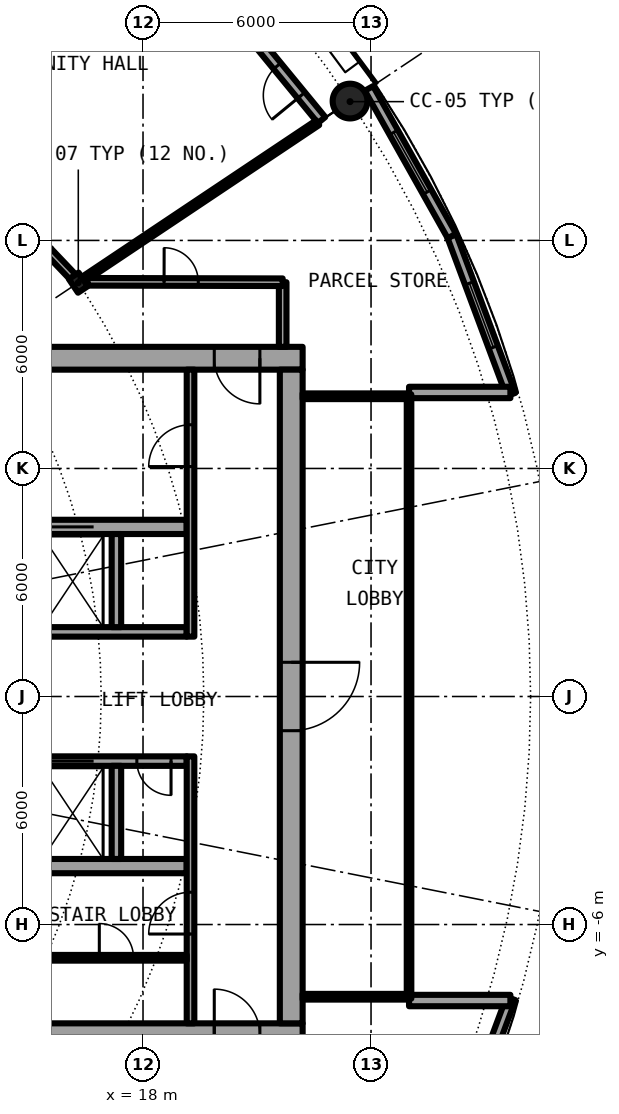
"""IFC4 building model, lengths in metres.
Left out: names, types, materials, properties, quantities, classifications, styles, units other than length and angle.
Written with IfcOpenShell. Run it as: python <this file> out.ifc"""

import sys

from ifc_helpers import new_model, si_unit, direction, frame, frame_2d, origin, origin_2d, place, context, subcontext, project, spatial, rectangle, hollow_circle, i_section, extrude, element, fill, save


model = new_model("IFC4")
c1 = context("Model", 3, precision=1e-05, world=origin(), true_north=direction((0.0, 1.0)))
c2 = subcontext(c1, "Body", "Model", "MODEL_VIEW")
j1 = project(units=[si_unit("LENGTHUNIT", "METRE"), si_unit("PLANEANGLEUNIT", "RADIAN")], contexts=[c1])
p1 = place(None, origin())
s1 = spatial("IfcSite", under=j1, at=p1, CompositionType="ELEMENT")
p2 = place(p1, origin())
s2 = spatial("IfcBuilding", under=s1, at=p2, CompositionType="ELEMENT")
p3 = place(p2, frame((0.0, 0.0, 107.45)))
s3 = spatial("IfcBuildingStorey", under=s2, at=p3, CompositionType="ELEMENT", Elevation=107.45)
p4 = place(p3, frame((23.448, 15.667, 0.0), z_axis=(0.0, 0.0, 1.0), x_axis=(1.0, 0.0, 0.0)))
e1 = element("IfcColumn", 1, at=p4, inside=s3, PredefinedType="COLUMN", context=c2, shape_type="SweptSolid", body=[
    extrude(hollow_circle(Radius=0.457, WallThickness=0.04, at=origin_2d()), origin(), (0.0, 0.0, 1.0), 4.2),
])
p5 = place(p3, frame((16.297, 10.889, 0.0), z_axis=(0.0, 0.0, 1.0), x_axis=(0.831469612303, 0.55557023302, 0.0)))
e2 = element("IfcColumn", 2, at=p5, inside=s3, PredefinedType="COLUMN", context=c2, shape_type="SweptSolid", body=[
    extrude(i_section(OverallWidth=0.307, OverallDepth=0.432, WebThickness=0.021, FlangeThickness=0.04, FilletRadius=0.027, at=origin_2d()), origin(), (0.0, 0.0, 1.0), 4.2),
])
p6 = place(p3, frame((22.699, 15.167, 0.0), z_axis=(0.0, 0.0, 1.0), x_axis=(-0.634382322723, 0.773019449054, 0.0)))
e3 = element("IfcWall", 3, at=p6, inside=s3, PredefinedType="SOLIDWALL", context=c2, shape_type="SweptSolid", body=[
    extrude(rectangle(XDim=5.352, YDim=0.25, at=frame_2d((2.676, 0.0))), origin(), (0.0, 0.0, 1.0), 3.85),
])
p7 = place(p6, frame((0.841, 0.0, 0.0)))
e4 = element("IfcOpeningElement", 4, at=p7, cuts=e3, PredefinedType="OPENING", context=c2, shape_type="SweptSolid", body=[
    extrude(rectangle(XDim=1.0, YDim=2.2, at=frame_2d((0.5, 1.1))), frame((0.0, 0.135, 0.0), z_axis=(0.0, -1.0, 0.0), x_axis=(1.0, 0.0, 0.0)), (0.0, 0.0, 1.0), 0.27),
])
p8 = place(p6, frame((3.51, 0.0, 0.0)))
e5 = element("IfcOpeningElement", 5, at=p8, cuts=e3, PredefinedType="OPENING", context=c2, shape_type="SweptSolid", body=[
    extrude(rectangle(XDim=1.0, YDim=2.2, at=frame_2d((0.5, 1.1))), frame((0.0, 0.135, 0.0), z_axis=(0.0, -1.0, 0.0), x_axis=(1.0, 0.0, 0.0)), (0.0, 0.0, 1.0), 0.27),
])
p9 = place(p3, frame((27.682, 7.945, 0.0), z_axis=(0.0, 0.0, 1.0), x_axis=(-0.349247811493, 0.937030397675, 0.0)))
e6 = element("IfcWall", 6, at=p9, inside=s3, PredefinedType="SOLIDWALL", context=c2, shape_type="SweptSolid", body=[
    extrude(rectangle(XDim=4.452, YDim=0.25, at=frame_2d((2.226, 0.0))), origin(), (0.0, 0.0, 1.0), 3.85),
])
p10 = place(p9, frame((1.327, 0.0, 0.3)))
e7 = element("IfcOpeningElement", 7, at=p10, cuts=e6, PredefinedType="OPENING", context=c2, shape_type="SweptSolid", body=[
    extrude(rectangle(XDim=1.8, YDim=2.1, at=frame_2d((0.9, 1.05))), frame((0.0, 0.135, 0.0), z_axis=(0.0, -1.0, 0.0), x_axis=(1.0, 0.0, 0.0)), (0.0, 0.0, 1.0), 0.27),
])
p11 = place(p3, frame((26.127, 12.117, 0.0), z_axis=(0.0, 0.0, 1.0), x_axis=(-0.489696356642, 0.871893042919, 0.0)))
e8 = element("IfcWall", 8, at=p11, inside=s3, PredefinedType="SOLIDWALL", context=c2, shape_type="SweptSolid", body=[
    extrude(rectangle(XDim=4.454, YDim=0.25, at=frame_2d((2.227, 0.0))), origin(), (0.0, 0.0, 1.0), 3.85),
])
p12 = place(p11, frame((1.327, 0.0, 0.3)))
e9 = element("IfcOpeningElement", 9, at=p12, cuts=e8, PredefinedType="OPENING", context=c2, shape_type="SweptSolid", body=[
    extrude(rectangle(XDim=1.8, YDim=2.1, at=frame_2d((0.9, 1.05))), frame((0.0, 0.135, 0.0), z_axis=(0.0, -1.0, 0.0), x_axis=(1.0, 0.0, 0.0)), (0.0, 0.0, 1.0), 0.27),
])
p13 = place(p3, frame((26.127, -12.117, 0.0), z_axis=(0.0, 0.0, 1.0), x_axis=(0.349247811493, 0.937030397675, 0.0)))
e10 = element("IfcWall", 10, at=p13, inside=s3, PredefinedType="SOLIDWALL", context=c2, shape_type="SweptSolid", body=[
    extrude(rectangle(XDim=4.452, YDim=0.25, at=frame_2d((2.226, 0.0))), origin(), (0.0, 0.0, 1.0), 3.85),
])
p14 = place(p13, frame((1.327, 0.0, 0.3)))
e11 = element("IfcOpeningElement", 11, at=p14, cuts=e10, PredefinedType="OPENING", context=c2, shape_type="SweptSolid", body=[
    extrude(rectangle(XDim=1.8, YDim=2.1, at=frame_2d((0.9, 1.05))), frame((0.0, 0.135, 0.0), z_axis=(0.0, -1.0, 0.0), x_axis=(1.0, 0.0, 0.0)), (0.0, 0.0, 1.0), 0.27),
])
for number, where, z_axis, x_axis in (
    (12, (25.0, 8.0, 0.0), (0.0, 0.0, 1.0), (1.0, 0.0, 0.0)),
    (13, (25.0, -8.0, 0.0), (0.0, 0.0, 1.0), (1.0, 0.0, 0.0)),
):
    element("IfcWall", number, at=place(p3, frame(where, z_axis=z_axis, x_axis=x_axis)), inside=s3, PredefinedType="SOLIDWALL", context=c2, shape_type="SweptSolid", body=[
        extrude(rectangle(XDim=2.667, YDim=0.3, at=frame_2d((1.333, 0.0))), origin(), (0.0, 0.0, 1.0), 3.85),
    ])
p15 = place(p3, frame((22.2, 8.9, 0.0), z_axis=(0.0, 0.0, 1.0), x_axis=(-1.0, 0.0, 0.0)))
e14 = element("IfcWall", 14, at=p15, inside=s3, PredefinedType="SHEAR", context=c2, shape_type="SweptSolid", body=[
    extrude(rectangle(XDim=13.8, YDim=0.6, at=frame_2d((6.9, 0.0))), origin(), (0.0, 0.0, 1.0), 4.2),
])
p16 = place(p15, frame((1.125, 0.0, 0.0)))
e15 = element("IfcOpeningElement", 15, at=p16, cuts=e14, PredefinedType="OPENING", context=c2, shape_type="SweptSolid", body=[
    extrude(rectangle(XDim=1.2, YDim=2.3, at=frame_2d((0.6, 1.15))), frame((0.0, 0.31, 0.0), z_axis=(0.0, -1.0, 0.0), x_axis=(1.0, 0.0, 0.0)), (0.0, 0.0, 1.0), 0.62),
])
p17 = place(p3, frame((8.4, -8.9, 0.0), z_axis=(0.0, 0.0, 1.0), x_axis=(1.0, 0.0, 0.0)))
e16 = element("IfcWall", 16, at=p17, inside=s3, PredefinedType="SHEAR", context=c2, shape_type="SweptSolid", body=[
    extrude(rectangle(XDim=13.8, YDim=0.6, at=frame_2d((6.9, 0.0))), origin(), (0.0, 0.0, 1.0), 4.2),
])
p18 = place(p17, frame((11.475, 0.0, 0.0)))
e17 = element("IfcOpeningElement", 17, at=p18, cuts=e16, PredefinedType="OPENING", context=c2, shape_type="SweptSolid", body=[
    extrude(rectangle(XDim=1.2, YDim=2.3, at=frame_2d((0.6, 1.15))), frame((0.0, 0.31, 0.0), z_axis=(0.0, -1.0, 0.0), x_axis=(1.0, 0.0, 0.0)), (0.0, 0.0, 1.0), 0.62),
])
p19 = place(p3, frame((21.9, 8.6, 0.0), z_axis=(0.0, 0.0, 1.0), x_axis=(0.0, -1.0, 0.0)))
e18 = element("IfcWall", 18, at=p19, inside=s3, PredefinedType="SHEAR", context=c2, shape_type="SweptSolid", body=[
    extrude(rectangle(XDim=17.2, YDim=0.6, at=frame_2d((8.6, 0.0))), origin(), (0.0, 0.0, 1.0), 4.2),
])
p20 = place(p19, frame((7.7, 0.0, 0.0)))
e19 = element("IfcOpeningElement", 19, at=p20, cuts=e18, PredefinedType="OPENING", context=c2, shape_type="SweptSolid", body=[
    extrude(rectangle(XDim=1.8, YDim=2.3, at=frame_2d((0.9, 1.15))), frame((0.0, 0.31, 0.0), z_axis=(0.0, -1.0, 0.0), x_axis=(1.0, 0.0, 0.0)), (0.0, 0.0, 1.0), 0.62),
])
p21 = place(p3, frame((9.0, 1.7, 0.0), z_axis=(0.0, 0.0, 1.0), x_axis=(1.0, 0.0, 0.0)))
e20 = element("IfcWall", 20, at=p21, inside=s3, PredefinedType="SHEAR", context=c2, shape_type="SweptSolid", body=[
    extrude(rectangle(XDim=10.15, YDim=0.25, at=frame_2d((5.075, 0.0))), origin(), (0.0, 0.0, 1.0), 4.2),
])
p22 = place(p21, frame((0.387, 0.0, 0.0)))
e21 = element("IfcOpeningElement", 21, at=p22, cuts=e20, PredefinedType="OPENING", context=c2, shape_type="SweptSolid", body=[
    extrude(rectangle(XDim=1.1, YDim=2.3, at=frame_2d((0.55, 1.15))), frame((0.0, 0.135, 0.0), z_axis=(0.0, -1.0, 0.0), x_axis=(1.0, 0.0, 0.0)), (0.0, 0.0, 1.0), 0.27),
])
p23 = place(p21, frame((2.45, 0.0, 0.0)))
e22 = element("IfcOpeningElement", 22, at=p23, cuts=e20, PredefinedType="OPENING", context=c2, shape_type="SweptSolid", body=[
    extrude(rectangle(XDim=1.1, YDim=2.3, at=frame_2d((0.55, 1.15))), frame((0.0, 0.135, 0.0), z_axis=(0.0, -1.0, 0.0), x_axis=(1.0, 0.0, 0.0)), (0.0, 0.0, 1.0), 0.27),
])
p24 = place(p21, frame((4.45, 0.0, 0.0)))
e23 = element("IfcOpeningElement", 23, at=p24, cuts=e20, PredefinedType="OPENING", context=c2, shape_type="SweptSolid", body=[
    extrude(rectangle(XDim=1.1, YDim=2.3, at=frame_2d((0.55, 1.15))), frame((0.0, 0.135, 0.0), z_axis=(0.0, -1.0, 0.0), x_axis=(1.0, 0.0, 0.0)), (0.0, 0.0, 1.0), 0.27),
])
p25 = place(p3, frame((9.0, 4.462, 0.0), z_axis=(0.0, 0.0, 1.0), x_axis=(1.0, 0.0, 0.0)))
e24 = element("IfcWall", 24, at=p25, inside=s3, PredefinedType="SHEAR", context=c2, shape_type="SweptSolid", body=[
    extrude(rectangle(XDim=10.15, YDim=0.375, at=frame_2d((5.075, 0.0))), origin(), (0.0, 0.0, 1.0), 4.2),
])
p26 = place(p25, frame((6.6, 0.0, 0.0)))
e25 = element("IfcOpeningElement", 25, at=p26, cuts=e24, PredefinedType="OPENING", context=c2, shape_type="SweptSolid", body=[
    extrude(rectangle(XDim=1.1, YDim=2.3, at=frame_2d((0.55, 1.15))), frame((0.0, 0.198, 0.0), z_axis=(0.0, -1.0, 0.0), x_axis=(1.0, 0.0, 0.0)), (0.0, 0.0, 1.0), 0.395),
])
p27 = place(p3, frame((17.3, 1.825, 0.0), z_axis=(0.0, 0.0, 1.0), x_axis=(0.0, 1.0, 0.0)))
e26 = element("IfcWall", 26, at=p27, inside=s3, PredefinedType="SOLIDWALL", context=c2, shape_type="SweptSolid", body=[
    extrude(rectangle(XDim=2.45, YDim=0.25, at=frame_2d((1.225, 0.0))), origin(), (0.0, 0.0, 1.0), 3.85),
])
p28 = place(p3, frame((19.25, 1.575, 0.0), z_axis=(0.0, 0.0, 1.0), x_axis=(0.0, 1.0, 0.0)))
e27 = element("IfcWall", 27, at=p28, inside=s3, PredefinedType="SOLIDWALL", context=c2, shape_type="SweptSolid", body=[
    extrude(rectangle(XDim=7.025, YDim=0.2, at=frame_2d((3.513, 0.0))), origin(), (0.0, 0.0, 1.0), 3.85),
])
p29 = place(p28, frame((4.475, 0.0, 0.0)))
e28 = element("IfcOpeningElement", 28, at=p29, cuts=e27, PredefinedType="OPENING", context=c2, shape_type="SweptSolid", body=[
    extrude(rectangle(XDim=1.1, YDim=2.3, at=frame_2d((0.55, 1.15))), frame((0.0, 0.11, 0.0), z_axis=(0.0, -1.0, 0.0), x_axis=(1.0, 0.0, 0.0)), (0.0, 0.0, 1.0), 0.22),
])
p30 = place(p3, frame((19.15, -1.7, 0.0), z_axis=(0.0, 0.0, 1.0), x_axis=(-1.0, 0.0, 0.0)))
e29 = element("IfcWall", 29, at=p30, inside=s3, PredefinedType="SHEAR", context=c2, shape_type="SweptSolid", body=[
    extrude(rectangle(XDim=10.15, YDim=0.25, at=frame_2d((5.075, 0.0))), origin(), (0.0, 0.0, 1.0), 4.2),
])
p31 = place(p30, frame((2.45, 0.0, 0.0)))
e30 = element("IfcOpeningElement", 30, at=p31, cuts=e29, PredefinedType="OPENING", context=c2, shape_type="SweptSolid", body=[
    extrude(rectangle(XDim=1.1, YDim=2.3, at=frame_2d((0.55, 1.15))), frame((0.0, 0.135, 0.0), z_axis=(0.0, -1.0, 0.0), x_axis=(1.0, 0.0, 0.0)), (0.0, 0.0, 1.0), 0.27),
])
p32 = place(p30, frame((8.788, 0.0, 0.0)))
e31 = element("IfcOpeningElement", 31, at=p32, cuts=e29, PredefinedType="OPENING", context=c2, shape_type="SweptSolid", body=[
    extrude(rectangle(XDim=0.9, YDim=2.3, at=frame_2d((0.45, 1.15))), frame((0.0, 0.135, 0.0), z_axis=(0.0, -1.0, 0.0), x_axis=(1.0, 0.0, 0.0)), (0.0, 0.0, 1.0), 0.27),
])
p33 = place(p30, frame((5.775, 0.0, 0.0)))
e32 = element("IfcOpeningElement", 32, at=p33, cuts=e29, PredefinedType="OPENING", context=c2, shape_type="SweptSolid", body=[
    extrude(rectangle(XDim=0.9, YDim=2.3, at=frame_2d((0.45, 1.15))), frame((0.0, 0.135, 0.0), z_axis=(0.0, -1.0, 0.0), x_axis=(1.0, 0.0, 0.0)), (0.0, 0.0, 1.0), 0.27),
])
p34 = place(p30, frame((0.413, 0.0, 0.0)))
e33 = element("IfcOpeningElement", 33, at=p34, cuts=e29, PredefinedType="OPENING", context=c2, shape_type="SweptSolid", body=[
    extrude(rectangle(XDim=0.9, YDim=2.3, at=frame_2d((0.45, 1.15))), frame((0.0, 0.135, 0.0), z_axis=(0.0, -1.0, 0.0), x_axis=(1.0, 0.0, 0.0)), (0.0, 0.0, 1.0), 0.27),
])
p35 = place(p3, frame((9.0, -4.462, 0.0), z_axis=(0.0, 0.0, 1.0), x_axis=(1.0, 0.0, 0.0)))
e34 = element("IfcWall", 34, at=p35, inside=s3, PredefinedType="SHEAR", context=c2, shape_type="SweptSolid", body=[
    extrude(rectangle(XDim=10.15, YDim=0.375, at=frame_2d((5.075, 0.0))), origin(), (0.0, 0.0, 1.0), 4.2),
])
p36 = place(p3, frame((17.3, -1.825, 0.0), z_axis=(0.0, 0.0, 1.0), x_axis=(0.0, -1.0, 0.0)))
e35 = element("IfcWall", 35, at=p36, inside=s3, PredefinedType="SOLIDWALL", context=c2, shape_type="SweptSolid", body=[
    extrude(rectangle(XDim=2.45, YDim=0.25, at=frame_2d((1.225, 0.0))), origin(), (0.0, 0.0, 1.0), 3.85),
])
p37 = place(p3, frame((19.25, -8.6, 0.0), z_axis=(0.0, 0.0, 1.0), x_axis=(0.0, 1.0, 0.0)))
e36 = element("IfcWall", 36, at=p37, inside=s3, PredefinedType="SOLIDWALL", context=c2, shape_type="SweptSolid", body=[
    extrude(rectangle(XDim=7.025, YDim=0.2, at=frame_2d((3.513, 0.0))), origin(), (0.0, 0.0, 1.0), 3.85),
])
p38 = place(p37, frame((2.35, 0.0, 0.0)))
e37 = element("IfcOpeningElement", 37, at=p38, cuts=e36, PredefinedType="OPENING", context=c2, shape_type="SweptSolid", body=[
    extrude(rectangle(XDim=1.1, YDim=2.3, at=frame_2d((0.55, 1.15))), frame((0.0, 0.11, 0.0), z_axis=(0.0, -1.0, 0.0), x_axis=(1.0, 0.0, 0.0)), (0.0, 0.0, 1.0), 0.22),
])
p39 = place(p3, frame((15.45, -6.875, 0.0), z_axis=(0.0, 0.0, 1.0), x_axis=(1.0, 0.0, 0.0)))
e38 = element("IfcWall", 38, at=p39, inside=s3, PredefinedType="PARTITIONING", context=c2, shape_type="SweptSolid", body=[
    extrude(rectangle(XDim=3.7, YDim=0.15, at=frame_2d((1.85, 0.0))), origin(), (0.0, 0.0, 1.0), 3.85),
])
p40 = place(p39, frame((1.4, 0.0, 0.0)))
e39 = element("IfcOpeningElement", 39, at=p40, cuts=e38, PredefinedType="OPENING", context=c2, shape_type="SweptSolid", body=[
    extrude(rectangle(XDim=0.9, YDim=2.3, at=frame_2d((0.45, 1.15))), frame((0.0, 0.085, 0.0), z_axis=(0.0, -1.0, 0.0), x_axis=(1.0, 0.0, 0.0)), (0.0, 0.0, 1.0), 0.17),
])
for number, where, z_axis, x_axis in (
    (40, (22.2, -7.9, 0.0), (0.0, 0.0, 1.0), (1.0, 0.0, 0.0)),
    (41, (22.2, 7.9, 0.0), (0.0, 0.0, 1.0), (1.0, 0.0, 0.0)),
):
    element("IfcWall", number, at=place(p3, frame(where, z_axis=z_axis, x_axis=x_axis)), inside=s3, PredefinedType="PARTITIONING", context=c2, shape_type="SweptSolid", body=[
        extrude(rectangle(XDim=2.74, YDim=0.15, at=frame_2d((1.37, 0.0))), origin(), (0.0, 0.0, 1.0), 3.85),
    ])
p41 = place(p3, frame((25.0, -7.95, 0.0), z_axis=(0.0, 0.0, 1.0), x_axis=(0.0, 1.0, 0.0)))
e42 = element("IfcWall", 42, at=p41, inside=s3, PredefinedType="PARTITIONING", context=c2, shape_type="SweptSolid", body=[
    extrude(rectangle(XDim=15.9, YDim=0.12, at=frame_2d((7.95, 0.0))), origin(), (0.0, 0.0, 1.0), 3.85),
])
p42 = place(p41, frame((0.95, 0.0, 0.1)))
e43 = element("IfcOpeningElement", 43, at=p42, cuts=e42, PredefinedType="OPENING", context=c2, shape_type="SweptSolid", body=[
    extrude(rectangle(XDim=14.0, YDim=3.5, at=frame_2d((7.0, 1.75))), frame((0.0, 0.07, 0.0), z_axis=(0.0, -1.0, 0.0), x_axis=(1.0, 0.0, 0.0)), (0.0, 0.0, 1.0), 0.14),
])
p43 = place(p3, frame((21.675, 9.2, 0.0), z_axis=(0.0, 0.0, 1.0), x_axis=(0.0, 1.0, 0.0)))
e44 = element("IfcWall", 44, at=p43, inside=s3, PredefinedType="PARTITIONING", context=c2, shape_type="SweptSolid", body=[
    extrude(rectangle(XDim=1.7, YDim=0.2, at=frame_2d((0.85, 0.0))), origin(), (0.0, 0.0, 1.0), 3.85),
])
p44 = place(p3, frame((16.477, 11.009, 0.0), z_axis=(0.0, 0.0, 1.0), x_axis=(0.831406593008, 0.555664536482, 0.0)))
e45 = element("IfcWall", 45, at=p44, inside=s3, PredefinedType="PARTITIONING", context=c2, shape_type="SweptSolid", body=[
    extrude(rectangle(XDim=7.358, YDim=0.15, at=frame_2d((3.679, 0.0))), origin(), (0.0, 0.0, 1.0), 3.85),
])
p45 = place(p3, frame((16.541, 10.912, 0.0), z_axis=(0.0, 0.0, 1.0), x_axis=(0.999997173357, -0.002377662213, 0.0)))
e46 = element("IfcWall", 46, at=p45, inside=s3, PredefinedType="PARTITIONING", context=c2, shape_type="SweptSolid", body=[
    extrude(rectangle(XDim=5.134, YDim=0.2, at=frame_2d((2.567, 0.0))), origin(), (0.0, 0.0, 1.0), 3.85),
])
p46 = place(p45, frame((2.013, 0.0, 0.0)))
e47 = element("IfcOpeningElement", 47, at=p46, cuts=e46, PredefinedType="OPENING", context=c2, shape_type="SweptSolid", body=[
    extrude(rectangle(XDim=0.9, YDim=2.3, at=frame_2d((0.45, 1.15))), frame((0.0, 0.11, 0.0), z_axis=(0.0, -1.0, 0.0), x_axis=(1.0, 0.0, 0.0)), (0.0, 0.0, 1.0), 0.22),
])
p47 = place(p3, frame((11.676, 15.743, 0.0), z_axis=(0.0, 0.0, 1.0), x_axis=(0.689473533908, -0.724310876655, 0.0)))
e48 = element("IfcWall", 48, at=p47, inside=s3, PredefinedType="PARTITIONING", context=c2, shape_type="SweptSolid", body=[
    extrude(rectangle(XDim=6.545, YDim=0.2, at=frame_2d((3.273, 0.0))), origin(), (0.0, 0.0, 1.0), 3.54),
])
p48 = place(p7, origin())
e49 = element("IfcDoor", 49, at=p48, inside=s3, OperationType="SINGLE_SWING_LEFT", PredefinedType="DOOR", context=c2, shape_type="SweptSolid", body=[
    extrude(rectangle(XDim=1.0, YDim=2.2, at=frame_2d((0.5, 1.1))), frame((0.0, 0.025, 0.0), z_axis=(0.0, -1.0, 0.0), x_axis=(1.0, 0.0, 0.0)), (0.0, 0.0, 1.0), 0.05),
])
fill(e4, e49)
p49 = place(p10, origin())
e50 = element("IfcWindow", 50, at=p49, inside=s3, PartitioningType="SINGLE_PANEL", PredefinedType="WINDOW", context=c2, shape_type="SweptSolid", body=[
    extrude(rectangle(XDim=1.8, YDim=2.1, at=frame_2d((0.9, 1.05))), frame((0.0, 0.03, 0.0), z_axis=(0.0, -1.0, 0.0), x_axis=(1.0, 0.0, 0.0)), (0.0, 0.0, 1.0), 0.06),
])
fill(e7, e50)
p50 = place(p12, origin())
e51 = element("IfcWindow", 51, at=p50, inside=s3, PartitioningType="SINGLE_PANEL", PredefinedType="WINDOW", context=c2, shape_type="SweptSolid", body=[
    extrude(rectangle(XDim=1.8, YDim=2.1, at=frame_2d((0.9, 1.05))), frame((0.0, 0.03, 0.0), z_axis=(0.0, -1.0, 0.0), x_axis=(1.0, 0.0, 0.0)), (0.0, 0.0, 1.0), 0.06),
])
fill(e9, e51)
p51 = place(p26, origin())
e52 = element("IfcDoor", 52, at=p51, inside=s3, OperationType="DOUBLE_DOOR_SLIDING", PredefinedType="DOOR", context=c2, shape_type="SweptSolid", body=[
    extrude(rectangle(XDim=1.1, YDim=2.3, at=frame_2d((0.55, 1.15))), frame((0.0, 0.025, 0.0), z_axis=(0.0, -1.0, 0.0), x_axis=(1.0, 0.0, 0.0)), (0.0, 0.0, 1.0), 0.05),
])
fill(e25, e52)
p52 = place(p31, origin())
e53 = element("IfcDoor", 53, at=p52, inside=s3, OperationType="DOUBLE_DOOR_SLIDING", PredefinedType="DOOR", context=c2, shape_type="SweptSolid", body=[
    extrude(rectangle(XDim=1.1, YDim=2.3, at=frame_2d((0.55, 1.15))), frame((0.0, 0.025, 0.0), z_axis=(0.0, -1.0, 0.0), x_axis=(1.0, 0.0, 0.0)), (0.0, 0.0, 1.0), 0.05),
])
fill(e30, e53)
p53 = place(p34, origin())
e54 = element("IfcDoor", 54, at=p53, inside=s3, OperationType="SINGLE_SWING_RIGHT", PredefinedType="DOOR", context=c2, shape_type="SweptSolid", body=[
    extrude(rectangle(XDim=0.9, YDim=2.3, at=frame_2d((0.45, 1.15))), frame((0.0, 0.025, 0.0), z_axis=(0.0, -1.0, 0.0), x_axis=(1.0, 0.0, 0.0)), (0.0, 0.0, 1.0), 0.05),
])
fill(e33, e54)
p54 = place(p40, origin())
e55 = element("IfcDoor", 55, at=p54, inside=s3, OperationType="SINGLE_SWING_LEFT", PredefinedType="DOOR", context=c2, shape_type="SweptSolid", body=[
    extrude(rectangle(XDim=0.9, YDim=2.3, at=frame_2d((0.45, 1.15))), frame((0.0, 0.025, 0.0), z_axis=(0.0, -1.0, 0.0), x_axis=(1.0, 0.0, 0.0)), (0.0, 0.0, 1.0), 0.05),
])
fill(e39, e55)
p55 = place(p29, origin())
e56 = element("IfcDoor", 56, at=p55, inside=s3, OperationType="SINGLE_SWING_LEFT", PredefinedType="DOOR", context=c2, shape_type="SweptSolid", body=[
    extrude(rectangle(XDim=1.1, YDim=2.3, at=frame_2d((0.55, 1.15))), frame((0.0, 0.025, 0.0), z_axis=(0.0, -1.0, 0.0), x_axis=(1.0, 0.0, 0.0)), (0.0, 0.0, 1.0), 0.05),
])
fill(e28, e56)
p56 = place(p38, origin())
e57 = element("IfcDoor", 57, at=p56, inside=s3, OperationType="SINGLE_SWING_RIGHT", PredefinedType="DOOR", context=c2, shape_type="SweptSolid", body=[
    extrude(rectangle(XDim=1.1, YDim=2.3, at=frame_2d((0.55, 1.15))), frame((0.0, 0.025, 0.0), z_axis=(0.0, -1.0, 0.0), x_axis=(1.0, 0.0, 0.0)), (0.0, 0.0, 1.0), 0.05),
])
fill(e37, e57)
p57 = place(p16, origin())
e58 = element("IfcDoor", 58, at=p57, inside=s3, OperationType="SINGLE_SWING_RIGHT", PredefinedType="DOOR", context=c2, shape_type="SweptSolid", body=[
    extrude(rectangle(XDim=1.2, YDim=2.3, at=frame_2d((0.6, 1.15))), frame((0.0, 0.025, 0.0), z_axis=(0.0, -1.0, 0.0), x_axis=(1.0, 0.0, 0.0)), (0.0, 0.0, 1.0), 0.05),
])
fill(e15, e58)
p58 = place(p18, origin())
e59 = element("IfcDoor", 59, at=p58, inside=s3, OperationType="SINGLE_SWING_LEFT", PredefinedType="DOOR", context=c2, shape_type="SweptSolid", body=[
    extrude(rectangle(XDim=1.2, YDim=2.3, at=frame_2d((0.6, 1.15))), frame((0.0, 0.025, 0.0), z_axis=(0.0, -1.0, 0.0), x_axis=(1.0, 0.0, 0.0)), (0.0, 0.0, 1.0), 0.05),
])
fill(e17, e59)
p59 = place(p20, origin())
e60 = element("IfcDoor", 60, at=p59, inside=s3, OperationType="SINGLE_SWING_LEFT", PredefinedType="DOOR", context=c2, shape_type="SweptSolid", body=[
    extrude(rectangle(XDim=1.8, YDim=2.3, at=frame_2d((0.9, 1.15))), frame((0.0, 0.025, 0.0), z_axis=(0.0, -1.0, 0.0), x_axis=(1.0, 0.0, 0.0)), (0.0, 0.0, 1.0), 0.05),
])
fill(e19, e60)
p60 = place(p42, origin())
e61 = element("IfcWindow", 61, at=p60, inside=s3, PartitioningType="SINGLE_PANEL", PredefinedType="WINDOW", context=c2, shape_type="SweptSolid", body=[
    extrude(rectangle(XDim=14.0, YDim=3.5, at=frame_2d((7.0, 1.75))), frame((0.0, 0.03, 0.0), z_axis=(0.0, -1.0, 0.0), x_axis=(1.0, 0.0, 0.0)), (0.0, 0.0, 1.0), 0.06),
])
fill(e43, e61)
p61 = place(p46, origin())
e62 = element("IfcDoor", 62, at=p61, inside=s3, OperationType="SINGLE_SWING_LEFT", PredefinedType="DOOR", context=c2, shape_type="SweptSolid", body=[
    extrude(rectangle(XDim=0.9, YDim=2.3, at=frame_2d((0.45, 1.15))), frame((0.0, 0.025, 0.0), z_axis=(0.0, -1.0, 0.0), x_axis=(1.0, 0.0, 0.0)), (0.0, 0.0, 1.0), 0.05),
])
fill(e47, e62)
save(model, sys.argv[1])
